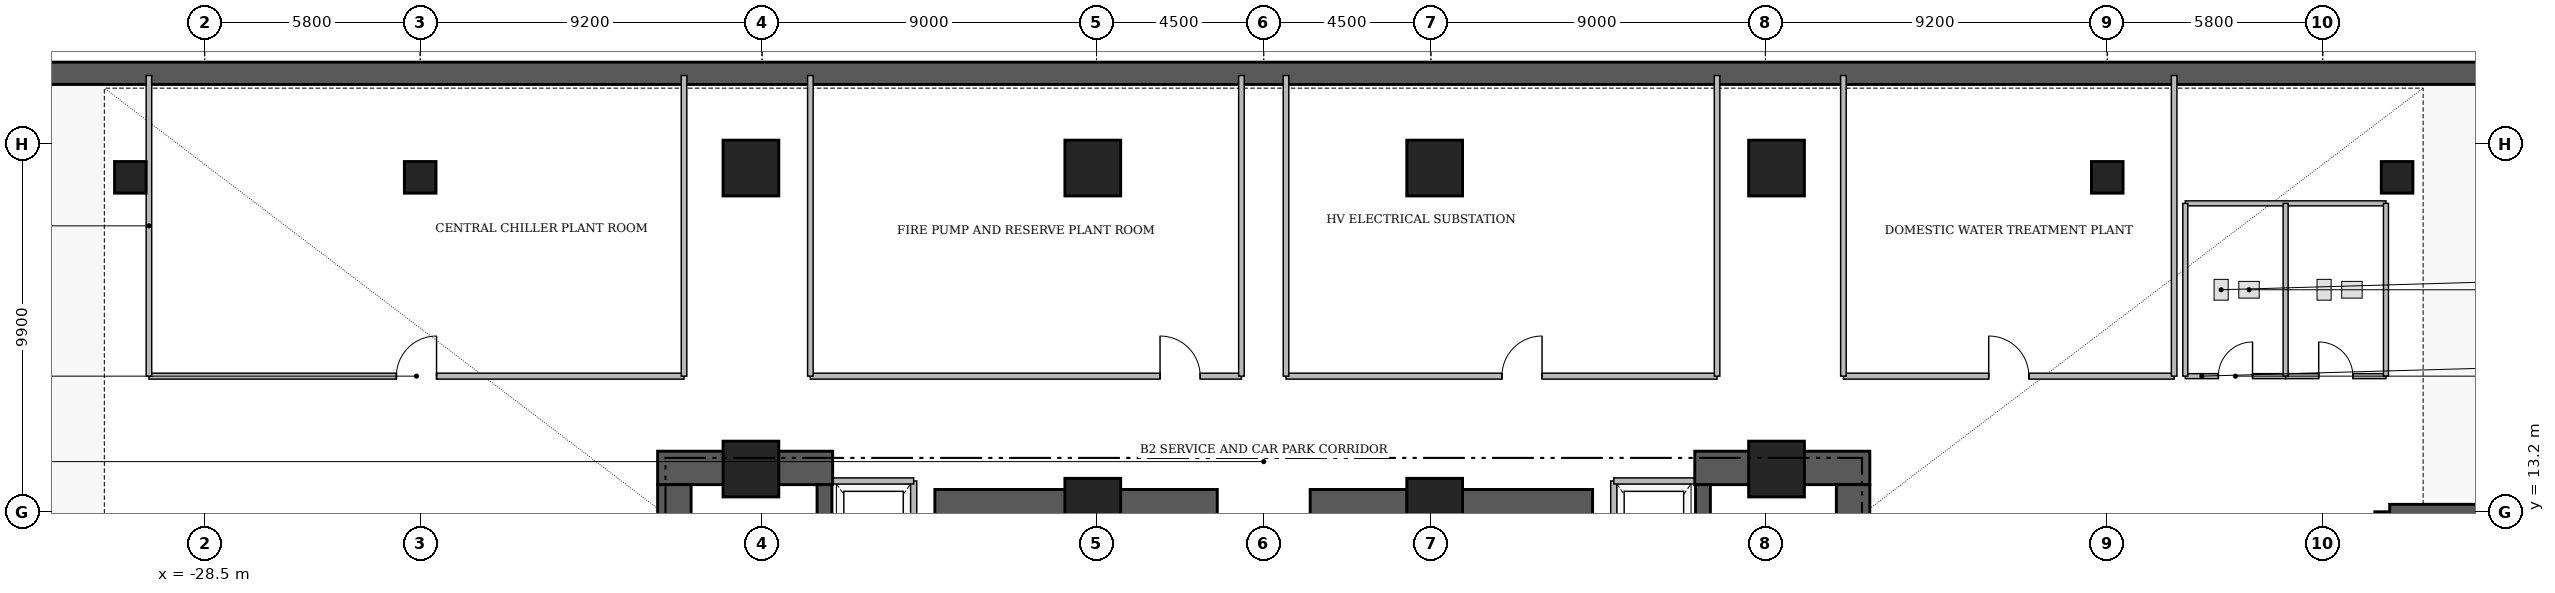
"""IFC4 building model, lengths in metres.
Left out: names, types, materials, properties, quantities, classifications, styles, units other than length and angle.
Written with IfcOpenShell. Run it as: python <this file> out.ifc"""

import sys

from ifc_helpers import new_model, si_unit, direction, frame, frame_2d, origin, origin_2d, place, context, subcontext, project, spatial, rectangle, extrude, element, fill, save


model = new_model("IFC4")
c1 = context("Model", 3, precision=1e-05, world=origin(), true_north=direction((0.0, 1.0)))
c2 = subcontext(c1, "Body", "Model", "MODEL_VIEW")
j1 = project(units=[si_unit("LENGTHUNIT", "METRE"), si_unit("PLANEANGLEUNIT", "RADIAN")], contexts=[c1])
p1 = place(None, origin())
s1 = spatial("IfcSite", under=j1, at=p1, CompositionType="ELEMENT")
p2 = place(p1, origin())
s2 = spatial("IfcBuilding", under=s1, at=p2, CompositionType="ELEMENT")
p3 = place(p2, frame((0.0, 0.0, -9.0)))
s3 = spatial("IfcBuildingStorey", under=s2, at=p3, CompositionType="ELEMENT", Elevation=-9.0)
p4 = place(p3, frame((-36.3, 25.0, 0.0), z_axis=(0.0, 0.0, 1.0), x_axis=(1.0, 0.0, 0.0)))
e1 = element("IfcWall", 1, at=p4, inside=s3, PredefinedType="USERDEFINED", context=c2, shape_type="SweptSolid", body=[
    extrude(rectangle(XDim=72.6, YDim=0.6, at=frame_2d((36.3, 0.0))), origin(), (0.0, 0.0, 1.0), 4.24),
])
for number, where, z_axis, x_axis in (
    (2, (-16.31, 14.38, 0.0), (0.0, 0.0, 1.0), (1.0, 0.0, 0.0)),
    (3, (11.6, 14.38, 0.0), (0.0, 0.0, 1.0), (1.0, 0.0, 0.0)),
):
    element("IfcWall", number, at=place(p3, frame(where, z_axis=z_axis, x_axis=x_axis)), inside=s3, PredefinedType="SHEAR", context=c2, shape_type="SweptSolid", body=[
        extrude(rectangle(XDim=4.71, YDim=0.9, at=frame_2d((2.355, 0.0))), origin(), (0.0, 0.0, 1.0), 4.31),
    ])
for number, where, z_axis, x_axis in (
    (4, (-15.86, 4.97, 0.0), (0.0, 0.0, 1.0), (0.0, 1.0, 0.0)),
    (5, (15.86, 4.97, 0.0), (0.0, 0.0, 1.0), (0.0, 1.0, 0.0)),
):
    element("IfcWall", number, at=place(p3, frame(where, z_axis=z_axis, x_axis=x_axis)), inside=s3, PredefinedType="SHEAR", context=c2, shape_type="SweptSolid", body=[
        extrude(rectangle(XDim=8.96, YDim=0.9, at=frame_2d((4.48, 0.0))), origin(), (0.0, 0.0, 1.0), 4.31),
    ])
for number, where, z_axis, x_axis in (
    (6, (-8.85, 13.35, 0.0), (0.0, 0.0, 1.0), (1.0, 0.0, 0.0)),
    (7, (1.25, 13.35, 0.0), (0.0, 0.0, 1.0), (1.0, 0.0, 0.0)),
):
    element("IfcWall", number, at=place(p3, frame(where, z_axis=z_axis, x_axis=x_axis)), inside=s3, PredefinedType="SHEAR", context=c2, shape_type="SweptSolid", body=[
        extrude(rectangle(XDim=7.6, YDim=0.9, at=frame_2d((3.8, 0.0))), origin(), (0.0, 0.0, 1.0), 4.24),
    ])
p5 = place(p3, frame((-11.82, 4.97, 0.0), z_axis=(0.0, 0.0, 1.0), x_axis=(0.0, 1.0, 0.0)))
e8 = element("IfcWall", 8, at=p5, inside=s3, PredefinedType="SHEAR", context=c2, shape_type="SweptSolid", body=[
    extrude(rectangle(XDim=8.96, YDim=0.4, at=frame_2d((4.48, 0.0))), origin(), (0.0, 0.0, 1.0), 4.31),
])
p6 = place(p5, frame((0.31, 0.0, 0.0)))
e9 = element("IfcOpeningElement", 9, at=p6, cuts=e8, PredefinedType="OPENING", context=c2, shape_type="SweptSolid", body=[
    extrude(rectangle(XDim=1.12, YDim=2.22, at=frame_2d((0.56, 1.11))), frame((0.0, 0.21, 0.0), z_axis=(0.0, -1.0, 0.0), x_axis=(1.0, 0.0, 0.0)), (0.0, 0.0, 1.0), 0.42),
])
p7 = place(p3, frame((11.82, 13.93, 0.0), z_axis=(0.0, 0.0, 1.0), x_axis=(0.0, -1.0, 0.0)))
e10 = element("IfcWall", 10, at=p7, inside=s3, PredefinedType="SHEAR", context=c2, shape_type="SweptSolid", body=[
    extrude(rectangle(XDim=8.96, YDim=0.4, at=frame_2d((4.48, 0.0))), origin(), (0.0, 0.0, 1.0), 4.31),
])
p8 = place(p7, frame((7.53, 0.0, 0.0)))
e11 = element("IfcOpeningElement", 11, at=p8, cuts=e10, PredefinedType="OPENING", context=c2, shape_type="SweptSolid", body=[
    extrude(rectangle(XDim=1.12, YDim=2.22, at=frame_2d((0.56, 1.11))), frame((0.0, 0.21, 0.0), z_axis=(0.0, -1.0, 0.0), x_axis=(1.0, 0.0, 0.0)), (0.0, 0.0, 1.0), 0.42),
])
p9 = place(p3, frame((30.1, 13.2, 0.0), z_axis=(0.0, 0.0, 1.0), x_axis=(0.0, -1.0, 0.0)))
e12 = element("IfcWall", 12, at=p9, inside=s3, PredefinedType="SHEAR", context=c2, shape_type="SweptSolid", body=[
    extrude(rectangle(XDim=11.8, YDim=0.4, at=frame_2d((5.9, 0.0))), origin(), (0.0, 0.0, 1.0), 4.31),
])
p10 = place(p9, frame((9.7, 0.0, 0.0)))
e13 = element("IfcOpeningElement", 13, at=p10, cuts=e12, PredefinedType="OPENING", context=c2, shape_type="SweptSolid", body=[
    extrude(rectangle(XDim=1.12, YDim=2.22, at=frame_2d((0.56, 1.11))), frame((0.0, 0.21, 0.0), z_axis=(0.0, -1.0, 0.0), x_axis=(1.0, 0.0, 0.0)), (0.0, 0.0, 1.0), 0.42),
])
p11 = place(p3, frame((30.3, 13.2, 0.0), z_axis=(0.0, 0.0, 1.0), x_axis=(1.0, 0.0, 0.0)))
e14 = element("IfcWall", 14, at=p11, inside=s3, PredefinedType="SHEAR", context=c2, shape_type="SweptSolid", body=[
    extrude(rectangle(XDim=5.4, YDim=0.4, at=frame_2d((2.7, 0.0))), origin(), (0.0, 0.0, 1.0), 4.31),
])
for number, where, z_axis, x_axis in (
    (15, (-13.8, 14.35, 0.0), (0.0, 0.0, 1.0), (1.0, 0.0, 0.0)),
    (16, (-4.6, 13.35, 0.0), (0.0, 0.0, 1.0), (1.0, 0.0, 0.0)),
    (17, (4.6, 13.35, 0.0), (0.0, 0.0, 1.0), (1.0, 0.0, 0.0)),
    (18, (13.8, 14.35, 0.0), (0.0, 0.0, 1.0), (1.0, 0.0, 0.0)),
    (19, (-13.8, 22.45, 0.0), (0.0, 0.0, 1.0), (1.0, 0.0, 0.0)),
    (20, (-4.6, 22.45, 0.0), (0.0, 0.0, 1.0), (1.0, 0.0, 0.0)),
    (21, (4.6, 22.45, 0.0), (0.0, 0.0, 1.0), (1.0, 0.0, 0.0)),
    (22, (13.8, 22.45, 0.0), (0.0, 0.0, 1.0), (1.0, 0.0, 0.0)),
):
    element("IfcColumn", number, at=place(p3, frame(where, z_axis=z_axis, x_axis=x_axis)), inside=s3, PredefinedType="COLUMN", context=c2, shape_type="SweptSolid", body=[
        extrude(rectangle(XDim=1.5, YDim=1.5, at=origin_2d()), origin(), (0.0, 0.0, 1.0), 4.5),
    ])
for number, where, z_axis, x_axis in (
    (23, (-30.5, 22.2, 0.0), (0.0, 0.0, 1.0), (1.0, 0.0, 0.0)),
    (24, (30.5, 22.2, 0.0), (0.0, 0.0, 1.0), (1.0, 0.0, 0.0)),
    (25, (-22.7, 22.2, 0.0), (0.0, 0.0, 1.0), (1.0, 0.0, 0.0)),
    (26, (22.7, 22.2, 0.0), (0.0, 0.0, 1.0), (1.0, 0.0, 0.0)),
):
    element("IfcColumn", number, at=place(p3, frame(where, z_axis=z_axis, x_axis=x_axis)), inside=s3, PredefinedType="COLUMN", context=c2, shape_type="SweptSolid", body=[
        extrude(rectangle(XDim=0.85, YDim=0.85, at=origin_2d()), origin(), (0.0, 0.0, 1.0), 4.5),
    ])
p12 = place(p3, frame((-30.0, 16.85, 0.0), z_axis=(0.0, 0.0, 1.0), x_axis=(1.0, 0.0, 0.0)))
e27 = element("IfcWall", 27, at=p12, inside=s3, PredefinedType="PARTITIONING", context=c2, shape_type="SweptSolid", body=[
    extrude(rectangle(XDim=14.4, YDim=0.16, at=frame_2d((7.2, 0.0))), origin(), (0.0, 0.0, 1.0), 4.24),
])
p13 = place(p12, frame((6.66, 0.0, 0.0)))
e28 = element("IfcOpeningElement", 28, at=p13, cuts=e27, PredefinedType="OPENING", context=c2, shape_type="SweptSolid", body=[
    extrude(rectangle(XDim=1.08, YDim=2.18, at=frame_2d((0.54, 1.09))), frame((0.0, 0.09, 0.0), z_axis=(0.0, -1.0, 0.0), x_axis=(1.0, 0.0, 0.0)), (0.0, 0.0, 1.0), 0.18),
])
p14 = place(p3, frame((-12.2, 16.85, 0.0), z_axis=(0.0, 0.0, 1.0), x_axis=(1.0, 0.0, 0.0)))
e29 = element("IfcWall", 29, at=p14, inside=s3, PredefinedType="PARTITIONING", context=c2, shape_type="SweptSolid", body=[
    extrude(rectangle(XDim=11.6, YDim=0.16, at=frame_2d((5.8, 0.0))), origin(), (0.0, 0.0, 1.0), 3.707),
])
p15 = place(p14, frame((9.41, 0.0, 0.0)))
e30 = element("IfcOpeningElement", 30, at=p15, cuts=e29, PredefinedType="OPENING", context=c2, shape_type="SweptSolid", body=[
    extrude(rectangle(XDim=1.08, YDim=2.18, at=frame_2d((0.54, 1.09))), frame((0.0, 0.09, 0.0), z_axis=(0.0, -1.0, 0.0), x_axis=(1.0, 0.0, 0.0)), (0.0, 0.0, 1.0), 0.18),
])
p16 = place(p3, frame((0.6, 16.85, 0.0), z_axis=(0.0, 0.0, 1.0), x_axis=(1.0, 0.0, 0.0)))
e31 = element("IfcWall", 31, at=p16, inside=s3, PredefinedType="PARTITIONING", context=c2, shape_type="SweptSolid", body=[
    extrude(rectangle(XDim=11.6, YDim=0.16, at=frame_2d((5.8, 0.0))), origin(), (0.0, 0.0, 1.0), 3.707),
])
p17 = place(p16, frame((5.81, 0.0, 0.0)))
e32 = element("IfcOpeningElement", 32, at=p17, cuts=e31, PredefinedType="OPENING", context=c2, shape_type="SweptSolid", body=[
    extrude(rectangle(XDim=1.08, YDim=2.18, at=frame_2d((0.54, 1.09))), frame((0.0, 0.09, 0.0), z_axis=(0.0, -1.0, 0.0), x_axis=(1.0, 0.0, 0.0)), (0.0, 0.0, 1.0), 0.18),
])
p18 = place(p3, frame((15.6, 16.85, 0.0), z_axis=(0.0, 0.0, 1.0), x_axis=(1.0, 0.0, 0.0)))
e33 = element("IfcWall", 33, at=p18, inside=s3, PredefinedType="PARTITIONING", context=c2, shape_type="SweptSolid", body=[
    extrude(rectangle(XDim=8.9, YDim=0.16, at=frame_2d((4.45, 0.0))), origin(), (0.0, 0.0, 1.0), 4.24),
])
p19 = place(p18, frame((3.91, 0.0, 0.0)))
e34 = element("IfcOpeningElement", 34, at=p19, cuts=e33, PredefinedType="OPENING", context=c2, shape_type="SweptSolid", body=[
    extrude(rectangle(XDim=1.08, YDim=2.18, at=frame_2d((0.54, 1.09))), frame((0.0, 0.09, 0.0), z_axis=(0.0, -1.0, 0.0), x_axis=(1.0, 0.0, 0.0)), (0.0, 0.0, 1.0), 0.18),
])
p20 = place(p3, frame((24.8, 16.85, 0.0), z_axis=(0.0, 0.0, 1.0), x_axis=(1.0, 0.0, 0.0)))
e35 = element("IfcWall", 35, at=p20, inside=s3, PredefinedType="PLUMBINGWALL", context=c2, shape_type="SweptSolid", body=[
    extrude(rectangle(XDim=2.7, YDim=0.135, at=frame_2d((1.35, 0.0))), origin(), (0.0, 0.0, 1.0), 4.24),
])
p21 = place(p20, frame((0.89, 0.0, 0.0)))
e36 = element("IfcOpeningElement", 36, at=p21, cuts=e35, PredefinedType="OPENING", context=c2, shape_type="SweptSolid", body=[
    extrude(rectangle(XDim=0.92, YDim=2.12, at=frame_2d((0.46, 1.06))), frame((0.0, 0.077, 0.0), z_axis=(0.0, -1.0, 0.0), x_axis=(1.0, 0.0, 0.0)), (0.0, 0.0, 1.0), 0.155),
])
p22 = place(p3, frame((27.5, 16.85, 0.0), z_axis=(0.0, 0.0, 1.0), x_axis=(1.0, 0.0, 0.0)))
e37 = element("IfcWall", 37, at=p22, inside=s3, PredefinedType="PLUMBINGWALL", context=c2, shape_type="SweptSolid", body=[
    extrude(rectangle(XDim=2.7, YDim=0.135, at=frame_2d((1.35, 0.0))), origin(), (0.0, 0.0, 1.0), 4.24),
])
p23 = place(p22, frame((0.89, 0.0, 0.0)))
e38 = element("IfcOpeningElement", 38, at=p23, cuts=e37, PredefinedType="OPENING", context=c2, shape_type="SweptSolid", body=[
    extrude(rectangle(XDim=0.92, YDim=2.12, at=frame_2d((0.46, 1.06))), frame((0.0, 0.077, 0.0), z_axis=(0.0, -1.0, 0.0), x_axis=(1.0, 0.0, 0.0)), (0.0, 0.0, 1.0), 0.155),
])
p24 = place(p3, frame((-9.42, 11.07, 0.0), z_axis=(0.0, 0.0, 1.0), x_axis=(0.0, 1.0, 0.0)))
e39 = element("IfcWall", 39, at=p24, inside=s3, PredefinedType="PARTITIONING", context=c2, shape_type="SweptSolid", body=[
    extrude(rectangle(XDim=2.96, YDim=0.165, at=frame_2d((1.48, 0.0))), origin(), (0.0, 0.0, 1.0), 4.24),
])
p25 = place(p3, frame((-11.58, 14.03, 0.0), z_axis=(0.0, 0.0, 1.0), x_axis=(1.0, 0.0, 0.0)))
e40 = element("IfcWall", 40, at=p25, inside=s3, PredefinedType="PARTITIONING", context=c2, shape_type="SweptSolid", body=[
    extrude(rectangle(XDim=2.16, YDim=0.165, at=frame_2d((1.08, 0.0))), origin(), (0.0, 0.0, 1.0), 4.24),
])
p26 = place(p3, frame((9.42, 11.07, 0.0), z_axis=(0.0, 0.0, 1.0), x_axis=(0.0, 1.0, 0.0)))
e41 = element("IfcWall", 41, at=p26, inside=s3, PredefinedType="PARTITIONING", context=c2, shape_type="SweptSolid", body=[
    extrude(rectangle(XDim=2.96, YDim=0.165, at=frame_2d((1.48, 0.0))), origin(), (0.0, 0.0, 1.0), 4.24),
])
p27 = place(p3, frame((9.42, 14.03, 0.0), z_axis=(0.0, 0.0, 1.0), x_axis=(1.0, 0.0, 0.0)))
e42 = element("IfcWall", 42, at=p27, inside=s3, PredefinedType="PARTITIONING", context=c2, shape_type="SweptSolid", body=[
    extrude(rectangle(XDim=2.16, YDim=0.165, at=frame_2d((1.08, 0.0))), origin(), (0.0, 0.0, 1.0), 4.24),
])
for number, where, z_axis, x_axis in (
    (43, (-30.0, 16.85, 0.0), (0.0, 0.0, 1.0), (0.0, 1.0, 0.0)),
    (44, (-15.6, 16.85, 0.0), (0.0, 0.0, 1.0), (0.0, 1.0, 0.0)),
    (45, (-12.2, 16.85, 0.0), (0.0, 0.0, 1.0), (0.0, 1.0, 0.0)),
    (46, (-0.6, 16.85, 0.0), (0.0, 0.0, 1.0), (0.0, 1.0, 0.0)),
    (47, (0.6, 16.85, 0.0), (0.0, 0.0, 1.0), (0.0, 1.0, 0.0)),
    (48, (12.2, 16.85, 0.0), (0.0, 0.0, 1.0), (0.0, 1.0, 0.0)),
    (49, (15.6, 16.85, 0.0), (0.0, 0.0, 1.0), (0.0, 1.0, 0.0)),
    (50, (24.5, 16.85, 0.0), (0.0, 0.0, 1.0), (0.0, 1.0, 0.0)),
):
    element("IfcWall", number, at=place(p3, frame(where, z_axis=z_axis, x_axis=x_axis)), inside=s3, PredefinedType="PARTITIONING", context=c2, shape_type="SweptSolid", body=[
        extrude(rectangle(XDim=8.09, YDim=0.15, at=frame_2d((4.045, 0.0))), origin(), (0.0, 0.0, 1.0), 4.24),
    ])
p28 = place(p3, frame((24.8, 21.5, 0.0), z_axis=(0.0, 0.0, 1.0), x_axis=(1.0, 0.0, 0.0)))
e51 = element("IfcWall", 51, at=p28, inside=s3, PredefinedType="PLUMBINGWALL", context=c2, shape_type="SweptSolid", body=[
    extrude(rectangle(XDim=5.4, YDim=0.135, at=frame_2d((2.7, 0.0))), origin(), (0.0, 0.0, 1.0), 4.24),
])
for number, where, z_axis, x_axis in (
    (52, (24.8, 16.85, 0.0), (0.0, 0.0, 1.0), (0.0, 1.0, 0.0)),
    (53, (30.2, 16.85, 0.0), (0.0, 0.0, 1.0), (0.0, 1.0, 0.0)),
    (54, (27.5, 16.85, 0.0), (0.0, 0.0, 1.0), (0.0, 1.0, 0.0)),
):
    element("IfcWall", number, at=place(p3, frame(where, z_axis=z_axis, x_axis=x_axis)), inside=s3, PredefinedType="PLUMBINGWALL", context=c2, shape_type="SweptSolid", body=[
        extrude(rectangle(XDim=4.65, YDim=0.135, at=frame_2d((2.325, 0.0))), origin(), (0.0, 0.0, 1.0), 4.24),
    ])
p29 = place(p13, origin())
e55 = element("IfcDoor", 55, at=p29, inside=s3, OperationType="SINGLE_SWING_RIGHT", PredefinedType="DOOR", context=c2, shape_type="SweptSolid", body=[
    extrude(rectangle(XDim=1.08, YDim=2.18, at=frame_2d((0.54, 1.09))), frame((0.0, 0.025, 0.0), z_axis=(0.0, -1.0, 0.0), x_axis=(1.0, 0.0, 0.0)), (0.0, 0.0, 1.0), 0.05),
])
fill(e28, e55)
p30 = place(p15, origin())
e56 = element("IfcDoor", 56, at=p30, inside=s3, OperationType="SINGLE_SWING_LEFT", PredefinedType="DOOR", context=c2, shape_type="SweptSolid", body=[
    extrude(rectangle(XDim=1.08, YDim=2.18, at=frame_2d((0.54, 1.09))), frame((0.0, 0.025, 0.0), z_axis=(0.0, -1.0, 0.0), x_axis=(1.0, 0.0, 0.0)), (0.0, 0.0, 1.0), 0.05),
])
fill(e30, e56)
p31 = place(p17, origin())
e57 = element("IfcDoor", 57, at=p31, inside=s3, OperationType="SINGLE_SWING_RIGHT", PredefinedType="DOOR", context=c2, shape_type="SweptSolid", body=[
    extrude(rectangle(XDim=1.08, YDim=2.18, at=frame_2d((0.54, 1.09))), frame((0.0, 0.025, 0.0), z_axis=(0.0, -1.0, 0.0), x_axis=(1.0, 0.0, 0.0)), (0.0, 0.0, 1.0), 0.05),
])
fill(e32, e57)
p32 = place(p19, origin())
e58 = element("IfcDoor", 58, at=p32, inside=s3, OperationType="SINGLE_SWING_LEFT", PredefinedType="DOOR", context=c2, shape_type="SweptSolid", body=[
    extrude(rectangle(XDim=1.08, YDim=2.18, at=frame_2d((0.54, 1.09))), frame((0.0, 0.025, 0.0), z_axis=(0.0, -1.0, 0.0), x_axis=(1.0, 0.0, 0.0)), (0.0, 0.0, 1.0), 0.05),
])
fill(e34, e58)
p33 = place(p21, origin())
e59 = element("IfcDoor", 59, at=p33, inside=s3, OperationType="SINGLE_SWING_RIGHT", PredefinedType="DOOR", context=c2, shape_type="SweptSolid", body=[
    extrude(rectangle(XDim=0.92, YDim=2.12, at=frame_2d((0.46, 1.06))), frame((0.0, 0.025, 0.0), z_axis=(0.0, -1.0, 0.0), x_axis=(1.0, 0.0, 0.0)), (0.0, 0.0, 1.0), 0.05),
])
fill(e36, e59)
p34 = place(p23, origin())
e60 = element("IfcDoor", 60, at=p34, inside=s3, OperationType="SINGLE_SWING_LEFT", PredefinedType="DOOR", context=c2, shape_type="SweptSolid", body=[
    extrude(rectangle(XDim=0.92, YDim=2.12, at=frame_2d((0.46, 1.06))), frame((0.0, 0.025, 0.0), z_axis=(0.0, -1.0, 0.0), x_axis=(1.0, 0.0, 0.0)), (0.0, 0.0, 1.0), 0.05),
])
fill(e38, e60)
save(model, sys.argv[1])
